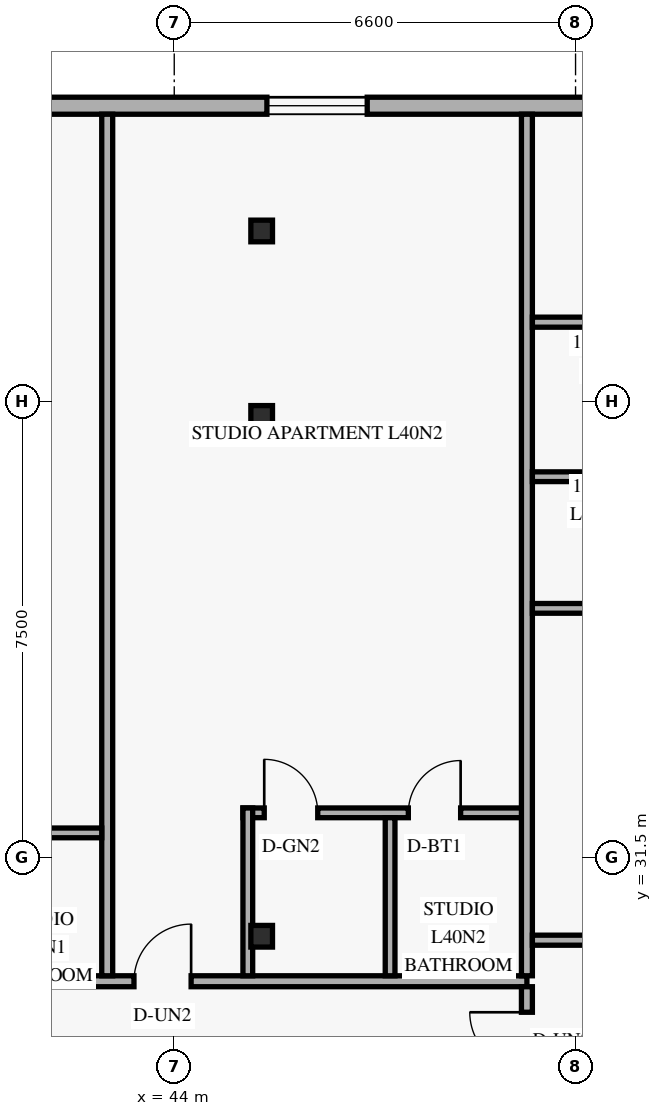
"""IFC4 building model, lengths in metres.
Left out: names, types, materials, properties, quantities, classifications, styles, units other than length and angle.
Written with IfcOpenShell. Run it as: python <this file> out.ifc"""

import sys

from ifc_helpers import new_model, si_unit, direction, frame, frame_2d, origin, origin_2d, place, context, subcontext, project, spatial, rectangle, hollow_rectangle, extrude, element, fill, save


model = new_model("IFC4")
c1 = context("Model", 3, precision=1e-05, world=origin(), true_north=direction((0.0, 1.0)))
c2 = subcontext(c1, "Body", "Model", "MODEL_VIEW")
j1 = project(units=[si_unit("LENGTHUNIT", "METRE"), si_unit("PLANEANGLEUNIT", "RADIAN")], contexts=[c1])
p1 = place(None, origin())
s1 = spatial("IfcSite", under=j1, at=p1, CompositionType="ELEMENT")
p2 = place(p1, origin())
s2 = spatial("IfcBuilding", under=s1, at=p2, CompositionType="ELEMENT")
p3 = place(p2, frame((0.0, 0.0, 155.4)))
s3 = spatial("IfcBuildingStorey", under=s2, at=p3, CompositionType="ELEMENT", Elevation=155.4)
for number, where, z_axis, x_axis in (
    (1, (45.375, 30.2, 0.0), (0.035, 0.0, 0.999), (0.0, 1.0, 0.0)),
    (2, (45.375, 38.75, 0.0), (0.035, 0.0, 0.999), (0.0, 1.0, 0.0)),
    (3, (45.375, 41.8, 0.0), (0.035, 0.0, 0.999), (0.0, 1.0, 0.0)),
):
    element("IfcColumn", number, at=place(p3, frame(where, z_axis=z_axis, x_axis=x_axis)), inside=s3, PredefinedType="COLUMN", context=c2, shape_type="SweptSolid", body=[
        extrude(hollow_rectangle(XDim=0.356, YDim=0.356, WallThickness=0.016, at=origin_2d()), origin(), (0.0, 0.0, 1.0), 3.602),
    ])
p4 = place(p3, frame((54.98, 43.86, 0.0), z_axis=(0.0, 0.0, 1.0), x_axis=(-1.0, 0.0, 0.0)))
e4 = element("IfcWall", 4, at=p4, inside=s3, PredefinedType="SOLIDWALL", context=c2, shape_type="SweptSolid", body=[
    extrude(rectangle(XDim=33.76, YDim=0.28, at=frame_2d((16.88, 0.0))), origin(), (0.0, 0.0, 1.0), 3.36),
])
p5 = place(p4, frame((28.555, 0.0, 0.85)))
e5 = element("IfcOpeningElement", 5, at=p5, cuts=e4, PredefinedType="OPENING", context=c2, shape_type="SweptSolid", body=[
    extrude(rectangle(XDim=1.65, YDim=1.6, at=frame_2d((0.825, 0.8))), frame((0.0, 0.15, 0.0), z_axis=(0.0, -1.0, 0.0), x_axis=(1.0, 0.0, 0.0)), (0.0, 0.0, 1.0), 0.3),
])
p6 = place(p4, frame((21.67, 0.0, 0.85)))
e6 = element("IfcOpeningElement", 6, at=p6, cuts=e4, PredefinedType="OPENING", context=c2, shape_type="SweptSolid", body=[
    extrude(rectangle(XDim=1.65, YDim=1.6, at=frame_2d((0.825, 0.8))), frame((0.0, 0.15, 0.0), z_axis=(0.0, -1.0, 0.0), x_axis=(1.0, 0.0, 0.0)), (0.0, 0.0, 1.0), 0.3),
])
p7 = place(p4, frame((14.996, 0.0, 0.85)))
e7 = element("IfcOpeningElement", 7, at=p7, cuts=e4, PredefinedType="OPENING", context=c2, shape_type="SweptSolid", body=[
    extrude(rectangle(XDim=1.65, YDim=1.6, at=frame_2d((0.825, 0.8))), frame((0.0, 0.15, 0.0), z_axis=(0.0, -1.0, 0.0), x_axis=(1.0, 0.0, 0.0)), (0.0, 0.0, 1.0), 0.3),
])
p8 = place(p4, frame((7.806, 0.0, 0.85)))
e8 = element("IfcOpeningElement", 8, at=p8, cuts=e4, PredefinedType="OPENING", context=c2, shape_type="SweptSolid", body=[
    extrude(rectangle(XDim=1.65, YDim=1.6, at=frame_2d((0.825, 0.8))), frame((0.0, 0.15, 0.0), z_axis=(0.0, -1.0, 0.0), x_axis=(1.0, 0.0, 0.0)), (0.0, 0.0, 1.0), 0.3),
])
p9 = place(p4, frame((1.765, 0.0, 0.85)))
e9 = element("IfcOpeningElement", 9, at=p9, cuts=e4, PredefinedType="OPENING", context=c2, shape_type="SweptSolid", body=[
    extrude(rectangle(XDim=1.65, YDim=1.6, at=frame_2d((0.825, 0.8))), frame((0.0, 0.15, 0.0), z_axis=(0.0, -1.0, 0.0), x_axis=(1.0, 0.0, 0.0)), (0.0, 0.0, 1.0), 0.3),
])
p10 = place(p3, frame((35.51, 29.46, 0.0), z_axis=(0.0, 0.0, 1.0), x_axis=(1.0, 0.0, 0.0)))
e10 = element("IfcWall", 10, at=p10, inside=s3, PredefinedType="STANDARD", context=c2, shape_type="SweptSolid", body=[
    extrude(rectangle(XDim=14.29, YDim=0.18, at=frame_2d((7.145, 0.0))), origin(), (0.0, 0.0, 1.0), 2.73),
])
p11 = place(p10, frame((0.35, 0.0, 0.0)))
e11 = element("IfcOpeningElement", 11, at=p11, cuts=e10, PredefinedType="OPENING", context=c2, shape_type="SweptSolid", body=[
    extrude(rectangle(XDim=0.94, YDim=2.15, at=frame_2d((0.47, 1.075))), frame((0.0, 0.1, 0.0), z_axis=(0.0, -1.0, 0.0), x_axis=(1.0, 0.0, 0.0)), (0.0, 0.0, 1.0), 0.2),
])
p12 = place(p10, frame((7.828, 0.0, 0.0)))
e12 = element("IfcOpeningElement", 12, at=p12, cuts=e10, PredefinedType="OPENING", context=c2, shape_type="SweptSolid", body=[
    extrude(rectangle(XDim=0.94, YDim=2.15, at=frame_2d((0.47, 1.075))), frame((0.0, 0.1, 0.0), z_axis=(0.0, -1.0, 0.0), x_axis=(1.0, 0.0, 0.0)), (0.0, 0.0, 1.0), 0.2),
])
p13 = place(p3, frame((42.898, 29.55, 0.0), z_axis=(0.0, 0.0, 1.0), x_axis=(0.0, 1.0, 0.0)))
e13 = element("IfcWall", 13, at=p13, inside=s3, PredefinedType="PARTITIONING", context=c2, shape_type="SweptSolid", body=[
    extrude(rectangle(XDim=14.17, YDim=0.18, at=frame_2d((7.085, 0.0))), origin(), (0.0, 0.0, 1.0), 2.73),
])
p14 = place(p3, frame((38.228, 31.9, 0.0), z_axis=(0.0, 0.0, 1.0), x_axis=(1.0, 0.0, 0.0)))
e14 = element("IfcWall", 14, at=p14, inside=s3, PredefinedType="PLUMBINGWALL", context=c2, shape_type="SweptSolid", body=[
    extrude(rectangle(XDim=4.58, YDim=0.16, at=frame_2d((2.29, 0.0))), origin(), (0.0, 0.0, 1.0), 3.36),
])
p15 = place(p14, frame((0.35, 0.0, 0.0)))
e15 = element("IfcOpeningElement", 15, at=p15, cuts=e14, PredefinedType="OPENING", context=c2, shape_type="SweptSolid", body=[
    extrude(rectangle(XDim=0.88, YDim=2.12, at=frame_2d((0.44, 1.06))), frame((0.0, 0.09, 0.0), z_axis=(0.0, -1.0, 0.0), x_axis=(1.0, 0.0, 0.0)), (0.0, 0.0, 1.0), 0.18),
])
p16 = place(p14, frame((2.72, 0.0, 0.0)))
e16 = element("IfcOpeningElement", 16, at=p16, cuts=e14, PredefinedType="OPENING", context=c2, shape_type="SweptSolid", body=[
    extrude(rectangle(XDim=0.86, YDim=2.12, at=frame_2d((0.43, 1.06))), frame((0.0, 0.09, 0.0), z_axis=(0.0, -1.0, 0.0), x_axis=(1.0, 0.0, 0.0)), (0.0, 0.0, 1.0), 0.18),
])
p17 = place(p3, frame((45.13, 32.23, 0.0), z_axis=(0.0, 0.0, 1.0), x_axis=(1.0, 0.0, 0.0)))
e17 = element("IfcWall", 17, at=p17, inside=s3, PredefinedType="PLUMBINGWALL", context=c2, shape_type="SweptSolid", body=[
    extrude(rectangle(XDim=4.67, YDim=0.16, at=frame_2d((2.335, 0.0))), origin(), (0.0, 0.0, 1.0), 2.73),
])
p18 = place(p17, frame((0.35, 0.0, 0.0)))
e18 = element("IfcOpeningElement", 18, at=p18, cuts=e17, PredefinedType="OPENING", context=c2, shape_type="SweptSolid", body=[
    extrude(rectangle(XDim=0.88, YDim=2.12, at=frame_2d((0.44, 1.06))), frame((0.0, 0.09, 0.0), z_axis=(0.0, -1.0, 0.0), x_axis=(1.0, 0.0, 0.0)), (0.0, 0.0, 1.0), 0.18),
])
p19 = place(p17, frame((2.72, 0.0, 0.0)))
e19 = element("IfcOpeningElement", 19, at=p19, cuts=e17, PredefinedType="OPENING", context=c2, shape_type="SweptSolid", body=[
    extrude(rectangle(XDim=0.86, YDim=2.12, at=frame_2d((0.43, 1.06))), frame((0.0, 0.09, 0.0), z_axis=(0.0, -1.0, 0.0), x_axis=(1.0, 0.0, 0.0)), (0.0, 0.0, 1.0), 0.18),
])
p20 = place(p3, frame((45.21, 29.55, 0.0), z_axis=(0.0, 0.0, 1.0), x_axis=(0.0, 1.0, 0.0)))
e20 = element("IfcWall", 20, at=p20, inside=s3, PredefinedType="PLUMBINGWALL", context=c2, shape_type="SweptSolid", body=[
    extrude(rectangle(XDim=2.76, YDim=0.16, at=frame_2d((1.38, 0.0))), origin(), (0.0, 0.0, 1.0), 2.73),
])
p21 = place(p3, frame((47.55, 29.55, 0.0), z_axis=(0.0, 0.0, 1.0), x_axis=(0.0, 1.0, 0.0)))
e21 = element("IfcWall", 21, at=p21, inside=s3, PredefinedType="PLUMBINGWALL", context=c2, shape_type="SweptSolid", body=[
    extrude(rectangle(XDim=2.6, YDim=0.16, at=frame_2d((1.3, 0.0))), origin(), (0.0, 0.0, 1.0), 2.73),
])
p22 = place(p3, frame((49.8, 27.65, 0.0), z_axis=(0.0, 0.0, 1.0), x_axis=(0.0, 1.0, 0.0)))
e22 = element("IfcWall", 22, at=p22, inside=s3, PredefinedType="STANDARD", context=c2, shape_type="SweptSolid", body=[
    extrude(rectangle(XDim=1.72, YDim=0.18, at=frame_2d((0.86, 0.0))), origin(), (0.0, 0.0, 1.0), 3.36),
])
p23 = place(p22, frame((0.36, 0.0, 0.0)))
e23 = element("IfcOpeningElement", 23, at=p23, cuts=e22, PredefinedType="OPENING", context=c2, shape_type="SweptSolid", body=[
    extrude(rectangle(XDim=0.94, YDim=2.15, at=frame_2d((0.47, 1.075))), frame((0.0, 0.1, 0.0), z_axis=(0.0, -1.0, 0.0), x_axis=(1.0, 0.0, 0.0)), (0.0, 0.0, 1.0), 0.2),
])
p24 = place(p3, frame((49.8, 29.55, 0.0), z_axis=(0.0, 0.0, 1.0), x_axis=(0.0, 1.0, 0.0)))
e24 = element("IfcWall", 24, at=p24, inside=s3, PredefinedType="PARTITIONING", context=c2, shape_type="SweptSolid", body=[
    extrude(rectangle(XDim=14.17, YDim=0.18, at=frame_2d((7.085, 0.0))), origin(), (0.0, 0.0, 1.0), 2.73),
])
p25 = place(p3, frame((49.89, 40.3, 0.0), z_axis=(0.0, 0.0, 1.0), x_axis=(1.0, 0.0, 0.0)))
e25 = element("IfcWall", 25, at=p25, inside=s3, PredefinedType="PARTITIONING", context=c2, shape_type="SweptSolid", body=[
    extrude(rectangle(XDim=8.43, YDim=0.165, at=frame_2d((4.215, 0.0))), origin(), (0.0, 0.0, 1.0), 2.879),
])
p26 = place(p25, frame((6.07, 0.0, 0.0)))
e26 = element("IfcOpeningElement", 26, at=p26, cuts=e25, PredefinedType="OPENING", context=c2, shape_type="SweptSolid", body=[
    extrude(rectangle(XDim=0.9, YDim=2.14, at=frame_2d((0.45, 1.07))), frame((0.0, 0.093, 0.0), z_axis=(0.0, -1.0, 0.0), x_axis=(1.0, 0.0, 0.0)), (0.0, 0.0, 1.0), 0.185),
])
p27 = place(p3, frame((49.89, 35.593, 0.0), z_axis=(0.0, 0.0, 1.0), x_axis=(1.0, 0.0, 0.0)))
e27 = element("IfcWall", 27, at=p27, inside=s3, PredefinedType="PLUMBINGWALL", context=c2, shape_type="SweptSolid", body=[
    extrude(rectangle(XDim=4.38, YDim=0.16, at=frame_2d((2.19, 0.0))), origin(), (0.0, 0.0, 1.0), 2.879),
])
p28 = place(p3, frame((49.89, 37.758, 0.0), z_axis=(0.0, 0.0, 1.0), x_axis=(1.0, 0.0, 0.0)))
e28 = element("IfcWall", 28, at=p28, inside=s3, PredefinedType="PLUMBINGWALL", context=c2, shape_type="SweptSolid", body=[
    extrude(rectangle(XDim=4.22, YDim=0.16, at=frame_2d((2.11, 0.0))), origin(), (0.0, 0.0, 1.0), 2.879),
])
p29 = place(p3, frame((49.89, 30.135, 0.0), z_axis=(0.0, 0.0, 1.0), x_axis=(1.0, 0.0, 0.0)))
e29 = element("IfcWall", 29, at=p29, inside=s3, PredefinedType="PARTITIONING", context=c2, shape_type="SweptSolid", body=[
    extrude(rectangle(XDim=8.43, YDim=0.165, at=frame_2d((4.215, 0.0))), origin(), (0.0, 0.0, 1.0), 2.73),
])
p30 = place(p29, frame((4.19, 0.0, 0.0)))
e30 = element("IfcOpeningElement", 30, at=p30, cuts=e29, PredefinedType="OPENING", context=c2, shape_type="SweptSolid", body=[
    extrude(rectangle(XDim=0.95, YDim=2.15, at=frame_2d((0.475, 1.075))), frame((0.0, 0.093, 0.0), z_axis=(0.0, -1.0, 0.0), x_axis=(1.0, 0.0, 0.0)), (0.0, 0.0, 1.0), 0.185),
])
p31 = place(p8, origin())
e31 = element("IfcWindow", 31, at=p31, inside=s3, PartitioningType="SINGLE_PANEL", PredefinedType="WINDOW", context=c2, shape_type="SweptSolid", body=[
    extrude(rectangle(XDim=1.65, YDim=1.6, at=frame_2d((0.825, 0.8))), frame((0.0, 0.03, 0.0), z_axis=(0.0, -1.0, 0.0), x_axis=(1.0, 0.0, 0.0)), (0.0, 0.0, 1.0), 0.06),
])
fill(e8, e31)
p32 = place(p12, origin())
e32 = element("IfcDoor", 32, at=p32, inside=s3, OperationType="SINGLE_SWING_RIGHT", PredefinedType="DOOR", context=c2, shape_type="SweptSolid", body=[
    extrude(rectangle(XDim=0.94, YDim=2.15, at=frame_2d((0.47, 1.075))), frame((0.0, 0.025, 0.0), z_axis=(0.0, -1.0, 0.0), x_axis=(1.0, 0.0, 0.0)), (0.0, 0.0, 1.0), 0.05),
])
fill(e12, e32)
p33 = place(p18, origin())
e33 = element("IfcDoor", 33, at=p33, inside=s3, OperationType="SINGLE_SWING_LEFT", PredefinedType="DOOR", context=c2, shape_type="SweptSolid", body=[
    extrude(rectangle(XDim=0.88, YDim=2.12, at=frame_2d((0.44, 1.06))), frame((0.0, 0.025, 0.0), z_axis=(0.0, -1.0, 0.0), x_axis=(1.0, 0.0, 0.0)), (0.0, 0.0, 1.0), 0.05),
])
fill(e18, e33)
p34 = place(p19, origin())
e34 = element("IfcDoor", 34, at=p34, inside=s3, OperationType="SINGLE_SWING_RIGHT", PredefinedType="DOOR", context=c2, shape_type="SweptSolid", body=[
    extrude(rectangle(XDim=0.86, YDim=2.12, at=frame_2d((0.43, 1.06))), frame((0.0, 0.025, 0.0), z_axis=(0.0, -1.0, 0.0), x_axis=(1.0, 0.0, 0.0)), (0.0, 0.0, 1.0), 0.05),
])
fill(e19, e34)
p35 = place(p23, origin())
e35 = element("IfcDoor", 35, at=p35, inside=s3, OperationType="SINGLE_SWING_RIGHT", PredefinedType="DOOR", context=c2, shape_type="SweptSolid", body=[
    extrude(rectangle(XDim=0.94, YDim=2.15, at=frame_2d((0.47, 1.075))), frame((0.0, 0.025, 0.0), z_axis=(0.0, -1.0, 0.0), x_axis=(1.0, 0.0, 0.0)), (0.0, 0.0, 1.0), 0.05),
])
fill(e23, e35)
save(model, sys.argv[1])
